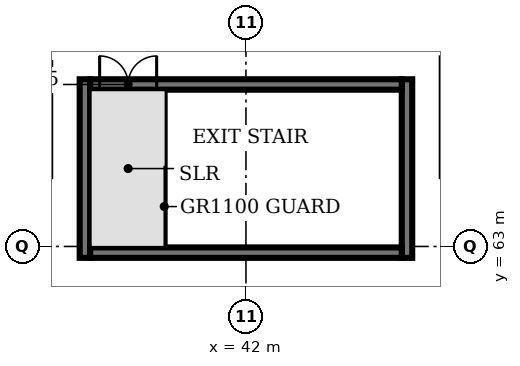
"""IFC4 building model, lengths in metres.
Left out: names, types, materials, properties, quantities, classifications, styles, units other than length and angle.
Written with IfcOpenShell. Run it as: python <this file> out.ifc"""

import sys

from ifc_helpers import new_model, si_unit, direction, frame, frame_2d, origin, place, context, subcontext, project, spatial, rectangle, extrude, element, fill, save


model = new_model("IFC4")
c1 = context("Model", 3, precision=1e-05, world=origin(), true_north=direction((0.0, 1.0)))
c2 = subcontext(c1, "Body", "Model", "MODEL_VIEW")
j1 = project(units=[si_unit("LENGTHUNIT", "METRE"), si_unit("PLANEANGLEUNIT", "RADIAN")], contexts=[c1])
p1 = place(None, origin())
s1 = spatial("IfcSite", under=j1, at=p1, CompositionType="ELEMENT")
p2 = place(p1, origin())
s2 = spatial("IfcBuilding", under=s1, at=p2, CompositionType="ELEMENT")
p3 = place(p2, frame((0.0, 0.0, 11.0)))
s3 = spatial("IfcBuildingStorey", under=s2, at=p3, CompositionType="ELEMENT", Elevation=11.0)
for number, where, z_axis, x_axis in (
    (1, (37.762, 62.7, 0.0), (0.0, 0.0, 1.0), (0.0, 1.0, 0.0)),
    (2, (46.238, 62.7, 0.0), (0.0, 0.0, 1.0), (0.0, 1.0, 0.0)),
):
    element("IfcWall", number, at=place(p3, frame(where, z_axis=z_axis, x_axis=x_axis)), inside=s3, PredefinedType="SHEAR", context=c2, shape_type="SweptSolid", body=[
        extrude(rectangle(XDim=4.7, YDim=0.275, at=frame_2d((2.35, 0.0))), origin(), (0.0, 0.0, 1.0), 3.0),
    ])
p4 = place(p3, frame((37.9, 62.837, 0.0), z_axis=(0.0, 0.0, 1.0), x_axis=(1.0, 0.0, 0.0)))
e3 = element("IfcWall", 3, at=p4, inside=s3, PredefinedType="SHEAR", context=c2, shape_type="SweptSolid", body=[
    extrude(rectangle(XDim=8.2, YDim=0.275, at=frame_2d((4.1, 0.0))), origin(), (0.0, 0.0, 1.0), 3.0),
])
p5 = place(p3, frame((37.9, 67.262, 0.0), z_axis=(0.0, 0.0, 1.0), x_axis=(1.0, 0.0, 0.0)))
e4 = element("IfcWall", 4, at=p5, inside=s3, PredefinedType="SHEAR", context=c2, shape_type="SweptSolid", body=[
    extrude(rectangle(XDim=8.2, YDim=0.275, at=frame_2d((4.1, 0.0))), origin(), (0.0, 0.0, 1.0), 3.0),
])
p6 = place(p5, frame((0.25, 0.0, 0.0)))
e5 = element("IfcOpeningElement", 5, at=p6, cuts=e4, PredefinedType="OPENING", context=c2, shape_type="SweptSolid", body=[
    extrude(rectangle(XDim=1.5, YDim=2.1, at=frame_2d((0.75, 1.05))), frame((0.0, 0.147, 0.0), z_axis=(0.0, -1.0, 0.0), x_axis=(1.0, 0.0, 0.0)), (0.0, 0.0, 1.0), 0.295),
])
p7 = place(p6, origin())
e6 = element("IfcDoor", 6, at=p7, inside=s3, OperationType="DOUBLE_DOOR_SINGLE_SWING", PredefinedType="DOOR", context=c2, shape_type="SweptSolid", body=[
    extrude(rectangle(XDim=1.5, YDim=2.1, at=frame_2d((0.75, 1.05))), frame((0.0, 0.025, 0.0), z_axis=(0.0, -1.0, 0.0), x_axis=(1.0, 0.0, 0.0)), (0.0, 0.0, 1.0), 0.05),
])
fill(e5, e6)
save(model, sys.argv[1])
